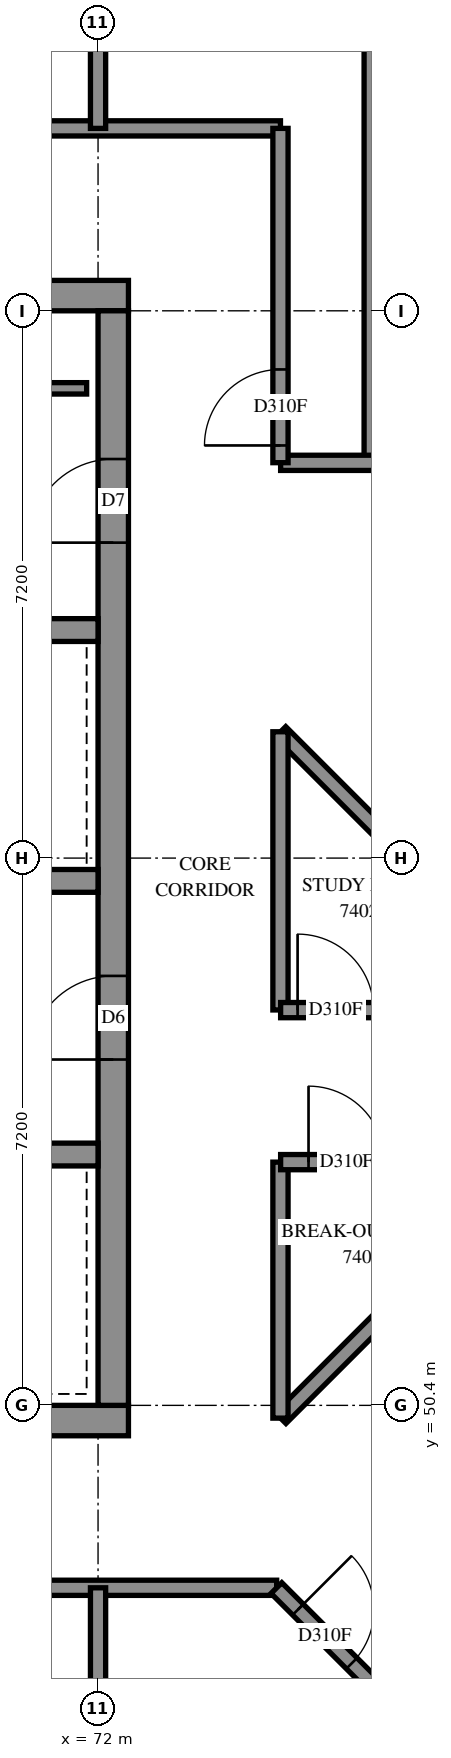
"""IFC4 building model, lengths in metres.
Left out: names, types, materials, properties, quantities, classifications, styles, units other than length and angle.
Written with IfcOpenShell. Run it as: python <this file> out.ifc"""

import sys

from ifc_helpers import new_model, si_unit, direction, frame, frame_2d, origin, place, context, subcontext, project, spatial, rectangle, extrude, element, fill, save


model = new_model("IFC4")
c1 = context("Model", 3, precision=1e-05, world=origin(), true_north=direction((0.0, 1.0)))
c2 = subcontext(c1, "Body", "Model", "MODEL_VIEW")
j1 = project(units=[si_unit("LENGTHUNIT", "METRE"), si_unit("PLANEANGLEUNIT", "RADIAN")], contexts=[c1])
p1 = place(None, origin())
s1 = spatial("IfcSite", under=j1, at=p1, CompositionType="ELEMENT")
p2 = place(p1, origin())
s2 = spatial("IfcBuilding", under=s1, at=p2, CompositionType="ELEMENT")
p3 = place(p2, frame((0.0, 0.0, 271.0)))
s3 = spatial("IfcBuildingStorey", under=s2, at=p3, CompositionType="ELEMENT", Elevation=271.0)
p4 = place(p3, frame((57.2, 50.2, -0.3), z_axis=(0.0, 0.0, 1.0), x_axis=(1.0, 0.0, 0.0)))
e1 = element("IfcWall", 1, at=p4, inside=s3, PredefinedType="SHEAR", context=c2, shape_type="SweptSolid", body=[
    extrude(rectangle(XDim=15.2, YDim=0.4, at=frame_2d((7.6, 0.0))), origin(), (0.0, 0.0, 1.0), 2.7),
])
p5 = place(p3, frame((57.2, 65.0, -0.3), z_axis=(0.0, 0.0, 1.0), x_axis=(1.0, 0.0, 0.0)))
e2 = element("IfcWall", 2, at=p5, inside=s3, PredefinedType="SHEAR", context=c2, shape_type="SweptSolid", body=[
    extrude(rectangle(XDim=15.2, YDim=0.4, at=frame_2d((7.6, 0.0))), origin(), (0.0, 0.0, 1.0), 2.7),
])
p6 = place(p5, frame((10.4, 0.0, 0.3)))
e3 = element("IfcOpeningElement", 3, at=p6, cuts=e2, PredefinedType="OPENING", context=c2, shape_type="SweptSolid", body=[
    extrude(rectangle(XDim=0.8, YDim=2.1, at=frame_2d((0.4, 1.05))), frame((0.0, 0.21, 0.0), z_axis=(0.0, -1.0, 0.0), x_axis=(1.0, 0.0, 0.0)), (0.0, 0.0, 1.0), 0.42),
])
p7 = place(p3, frame((72.2, 50.4, -0.3), z_axis=(0.0, 0.0, 1.0), x_axis=(0.0, 1.0, 0.0)))
e4 = element("IfcWall", 4, at=p7, inside=s3, PredefinedType="SHEAR", context=c2, shape_type="SweptSolid", body=[
    extrude(rectangle(XDim=14.4, YDim=0.4, at=frame_2d((7.2, 0.0))), origin(), (0.0, 0.0, 1.0), 2.7),
])
p8 = place(p7, frame((4.55, 0.0, 0.3)))
e5 = element("IfcOpeningElement", 5, at=p8, cuts=e4, PredefinedType="OPENING", context=c2, shape_type="SweptSolid", body=[
    extrude(rectangle(XDim=1.1, YDim=2.1, at=frame_2d((0.55, 1.05))), frame((0.0, 0.21, 0.0), z_axis=(0.0, -1.0, 0.0), x_axis=(1.0, 0.0, 0.0)), (0.0, 0.0, 1.0), 0.42),
])
p9 = place(p7, frame((11.35, 0.0, 0.3)))
e6 = element("IfcOpeningElement", 6, at=p9, cuts=e4, PredefinedType="OPENING", context=c2, shape_type="SweptSolid", body=[
    extrude(rectangle(XDim=1.1, YDim=2.1, at=frame_2d((0.55, 1.05))), frame((0.0, 0.21, 0.0), z_axis=(0.0, -1.0, 0.0), x_axis=(1.0, 0.0, 0.0)), (0.0, 0.0, 1.0), 0.42),
])
p10 = place(p3, frame((57.6, 53.7, 0.0), z_axis=(0.0, 0.0, 1.0), x_axis=(1.0, 0.0, 0.0)))
e7 = element("IfcWall", 7, at=p10, inside=s3, PredefinedType="SOLIDWALL", context=c2, shape_type="SweptSolid", body=[
    extrude(rectangle(XDim=14.4, YDim=0.3, at=frame_2d((7.2, 0.0))), origin(), (0.0, 0.0, 1.0), 3.1),
])
p11 = place(p10, frame((1.35, 0.0, 0.0)))
e8 = element("IfcOpeningElement", 8, at=p11, cuts=e7, PredefinedType="OPENING", context=c2, shape_type="SweptSolid", body=[
    extrude(rectangle(XDim=0.9, YDim=2.1, at=frame_2d((0.45, 1.05))), frame((0.0, 0.16, 0.0), z_axis=(0.0, -1.0, 0.0), x_axis=(1.0, 0.0, 0.0)), (0.0, 0.0, 1.0), 0.32),
])
p12 = place(p10, frame((4.95, 0.0, 0.0)))
e9 = element("IfcOpeningElement", 9, at=p12, cuts=e7, PredefinedType="OPENING", context=c2, shape_type="SweptSolid", body=[
    extrude(rectangle(XDim=0.9, YDim=2.1, at=frame_2d((0.45, 1.05))), frame((0.0, 0.16, 0.0), z_axis=(0.0, -1.0, 0.0), x_axis=(1.0, 0.0, 0.0)), (0.0, 0.0, 1.0), 0.32),
])
p13 = place(p10, frame((8.55, 0.0, 0.0)))
e10 = element("IfcOpeningElement", 10, at=p13, cuts=e7, PredefinedType="OPENING", context=c2, shape_type="SweptSolid", body=[
    extrude(rectangle(XDim=0.9, YDim=2.1, at=frame_2d((0.45, 1.05))), frame((0.0, 0.16, 0.0), z_axis=(0.0, -1.0, 0.0), x_axis=(1.0, 0.0, 0.0)), (0.0, 0.0, 1.0), 0.32),
])
p14 = place(p10, frame((12.05, 0.0, 0.0)))
e11 = element("IfcOpeningElement", 11, at=p14, cuts=e7, PredefinedType="OPENING", context=c2, shape_type="SweptSolid", body=[
    extrude(rectangle(XDim=1.1, YDim=2.1, at=frame_2d((0.55, 1.05))), frame((0.0, 0.16, 0.0), z_axis=(0.0, -1.0, 0.0), x_axis=(1.0, 0.0, 0.0)), (0.0, 0.0, 1.0), 0.32),
])
p15 = place(p3, frame((57.6, 57.3, 0.0), z_axis=(0.0, 0.0, 1.0), x_axis=(1.0, 0.0, 0.0)))
e12 = element("IfcWall", 12, at=p15, inside=s3, PredefinedType="SOLIDWALL", context=c2, shape_type="SweptSolid", body=[
    extrude(rectangle(XDim=14.4, YDim=0.3, at=frame_2d((7.2, 0.0))), origin(), (0.0, 0.0, 1.0), 3.1),
])
p16 = place(p15, frame((8.55, 0.0, 0.0)))
e13 = element("IfcOpeningElement", 13, at=p16, cuts=e12, PredefinedType="OPENING", context=c2, shape_type="SweptSolid", body=[
    extrude(rectangle(XDim=0.9, YDim=2.1, at=frame_2d((0.45, 1.05))), frame((0.0, 0.16, 0.0), z_axis=(0.0, -1.0, 0.0), x_axis=(1.0, 0.0, 0.0)), (0.0, 0.0, 1.0), 0.32),
])
p17 = place(p15, frame((1.25, 0.0, 0.0)))
e14 = element("IfcOpeningElement", 14, at=p17, cuts=e12, PredefinedType="OPENING", context=c2, shape_type="SweptSolid", body=[
    extrude(rectangle(XDim=1.1, YDim=2.1, at=frame_2d((0.55, 1.05))), frame((0.0, 0.16, 0.0), z_axis=(0.0, -1.0, 0.0), x_axis=(1.0, 0.0, 0.0)), (0.0, 0.0, 1.0), 0.32),
])
p18 = place(p15, frame((4.85, 0.0, 0.0)))
e15 = element("IfcOpeningElement", 15, at=p18, cuts=e12, PredefinedType="OPENING", context=c2, shape_type="SweptSolid", body=[
    extrude(rectangle(XDim=1.1, YDim=2.1, at=frame_2d((0.55, 1.05))), frame((0.0, 0.16, 0.0), z_axis=(0.0, -1.0, 0.0), x_axis=(1.0, 0.0, 0.0)), (0.0, 0.0, 1.0), 0.32),
])
p19 = place(p15, frame((12.05, 0.0, 0.0)))
e16 = element("IfcOpeningElement", 16, at=p19, cuts=e12, PredefinedType="OPENING", context=c2, shape_type="SweptSolid", body=[
    extrude(rectangle(XDim=1.1, YDim=2.1, at=frame_2d((0.55, 1.05))), frame((0.0, 0.16, 0.0), z_axis=(0.0, -1.0, 0.0), x_axis=(1.0, 0.0, 0.0)), (0.0, 0.0, 1.0), 0.32),
])
p20 = place(p3, frame((64.8, 60.6, 0.0), z_axis=(0.0, 0.0, 1.0), x_axis=(1.0, 0.0, 0.0)))
e17 = element("IfcWall", 17, at=p20, inside=s3, PredefinedType="SOLIDWALL", context=c2, shape_type="SweptSolid", body=[
    extrude(rectangle(XDim=7.2, YDim=0.3, at=frame_2d((3.6, 0.0))), origin(), (0.0, 0.0, 1.0), 3.1),
])
p21 = place(p3, frame((64.95, 63.78, 0.0), z_axis=(0.0, 0.0, 1.0), x_axis=(1.0, 0.0, 0.0)))
e18 = element("IfcWall", 18, at=p21, inside=s3, PredefinedType="PARTITIONING", context=c2, shape_type="SweptSolid", body=[
    extrude(rectangle(XDim=6.9, YDim=0.15, at=frame_2d((3.45, 0.0))), origin(), (0.0, 0.0, 1.0), 3.1),
])
p22 = place(p3, frame((55.2, 67.2, 0.0), z_axis=(0.0, 0.0, 1.0), x_axis=(1.0, 0.0, 0.0)))
e19 = element("IfcWall", 19, at=p22, inside=s3, PredefinedType="PARTITIONING", context=c2, shape_type="SweptSolid", body=[
    extrude(rectangle(XDim=19.2, YDim=0.2, at=frame_2d((9.6, 0.0))), origin(), (0.0, 0.0, 1.0), 3.1),
])
p23 = place(p22, frame((4.492, 0.0, 0.0)))
e20 = element("IfcOpeningElement", 20, at=p23, cuts=e19, PredefinedType="OPENING", context=c2, shape_type="SweptSolid", body=[
    extrude(rectangle(XDim=1.0, YDim=2.1, at=frame_2d((0.5, 1.05))), frame((0.0, 0.11, 0.0), z_axis=(0.0, -1.0, 0.0), x_axis=(1.0, 0.0, 0.0)), (0.0, 0.0, 1.0), 0.22),
])
p24 = place(p22, frame((6.567, 0.0, 0.0)))
e21 = element("IfcOpeningElement", 21, at=p24, cuts=e19, PredefinedType="OPENING", context=c2, shape_type="SweptSolid", body=[
    extrude(rectangle(XDim=1.0, YDim=2.1, at=frame_2d((0.5, 1.05))), frame((0.0, 0.11, 0.0), z_axis=(0.0, -1.0, 0.0), x_axis=(1.0, 0.0, 0.0)), (0.0, 0.0, 1.0), 0.22),
])
p25 = place(p22, frame((11.693, 0.0, 0.0)))
e22 = element("IfcOpeningElement", 22, at=p25, cuts=e19, PredefinedType="OPENING", context=c2, shape_type="SweptSolid", body=[
    extrude(rectangle(XDim=1.0, YDim=2.1, at=frame_2d((0.5, 1.05))), frame((0.0, 0.11, 0.0), z_axis=(0.0, -1.0, 0.0), x_axis=(1.0, 0.0, 0.0)), (0.0, 0.0, 1.0), 0.22),
])
p26 = place(p22, frame((13.88, 0.0, 0.0)))
e23 = element("IfcOpeningElement", 23, at=p26, cuts=e19, PredefinedType="OPENING", context=c2, shape_type="SweptSolid", body=[
    extrude(rectangle(XDim=1.0, YDim=2.1, at=frame_2d((0.5, 1.05))), frame((0.0, 0.11, 0.0), z_axis=(0.0, -1.0, 0.0), x_axis=(1.0, 0.0, 0.0)), (0.0, 0.0, 1.0), 0.22),
])
p27 = place(p3, frame((55.2, 48.0, 0.0), z_axis=(0.0, 0.0, 1.0), x_axis=(1.0, 0.0, 0.0)))
e24 = element("IfcWall", 24, at=p27, inside=s3, PredefinedType="PARTITIONING", context=c2, shape_type="SweptSolid", body=[
    extrude(rectangle(XDim=19.15, YDim=0.2, at=frame_2d((9.575, 0.0))), origin(), (0.0, 0.0, 1.0), 3.1),
])
p28 = place(p27, frame((4.433, 0.0, 0.0)))
e25 = element("IfcOpeningElement", 25, at=p28, cuts=e24, PredefinedType="OPENING", context=c2, shape_type="SweptSolid", body=[
    extrude(rectangle(XDim=1.0, YDim=2.1, at=frame_2d((0.5, 1.05))), frame((0.0, 0.11, 0.0), z_axis=(0.0, -1.0, 0.0), x_axis=(1.0, 0.0, 0.0)), (0.0, 0.0, 1.0), 0.22),
])
p29 = place(p27, frame((6.508, 0.0, 0.0)))
e26 = element("IfcOpeningElement", 26, at=p29, cuts=e24, PredefinedType="OPENING", context=c2, shape_type="SweptSolid", body=[
    extrude(rectangle(XDim=1.0, YDim=2.1, at=frame_2d((0.5, 1.05))), frame((0.0, 0.11, 0.0), z_axis=(0.0, -1.0, 0.0), x_axis=(1.0, 0.0, 0.0)), (0.0, 0.0, 1.0), 0.22),
])
p30 = place(p27, frame((13.499, 0.0, 0.0)))
e27 = element("IfcOpeningElement", 27, at=p30, cuts=e24, PredefinedType="OPENING", context=c2, shape_type="SweptSolid", body=[
    extrude(rectangle(XDim=0.9, YDim=2.1, at=frame_2d((0.45, 1.05))), frame((0.0, 0.11, 0.0), z_axis=(0.0, -1.0, 0.0), x_axis=(1.0, 0.0, 0.0)), (0.0, 0.0, 1.0), 0.22),
])
p31 = place(p3, frame((75.6, 62.8, 0.0), z_axis=(0.0, 0.0, 1.0), x_axis=(0.0, 1.0, 0.0)))
e28 = element("IfcWall", 28, at=p31, inside=s3, PredefinedType="PARTITIONING", context=c2, shape_type="SweptSolid", body=[
    extrude(rectangle(XDim=10.049, YDim=0.2, at=frame_2d((5.025, 0.0))), origin(), (0.0, 0.0, 1.0), 3.1),
])
p32 = place(p3, frame((74.402, 62.8, 0.0), z_axis=(0.0, 0.0, 1.0), x_axis=(1.0, 0.0, 0.0)))
e29 = element("IfcWall", 29, at=p32, inside=s3, PredefinedType="PARTITIONING", context=c2, shape_type="SweptSolid", body=[
    extrude(rectangle(XDim=4.798, YDim=0.2, at=frame_2d((2.399, 0.0))), origin(), (0.0, 0.0, 1.0), 3.1),
])
p33 = place(p32, frame((1.766, 0.0, 0.0)))
e30 = element("IfcOpeningElement", 30, at=p33, cuts=e29, PredefinedType="OPENING", context=c2, shape_type="SweptSolid", body=[
    extrude(rectangle(XDim=1.0, YDim=2.1, at=frame_2d((0.5, 1.05))), frame((0.0, 0.11, 0.0), z_axis=(0.0, -1.0, 0.0), x_axis=(1.0, 0.0, 0.0)), (0.0, 0.0, 1.0), 0.22),
])
p34 = place(p3, frame((74.401, 50.233, 0.0), z_axis=(0.0, 0.0, 1.0), x_axis=(0.7071067812, 0.7071067812, 0.0)))
e31 = element("IfcWall", 31, at=p34, inside=s3, PredefinedType="PARTITIONING", context=c2, shape_type="SweptSolid", body=[
    extrude(rectangle(XDim=4.76, YDim=0.2, at=frame_2d((2.38, 0.0))), origin(), (0.0, 0.0, 1.0), 3.1),
])
p35 = place(p3, frame((74.347, 47.997, 0.0), z_axis=(0.0, 0.0, 1.0), x_axis=(0.7071067812, -0.7071067812, 0.0)))
e32 = element("IfcWall", 32, at=p35, inside=s3, PredefinedType="PARTITIONING", context=c2, shape_type="SweptSolid", body=[
    extrude(rectangle(XDim=4.596, YDim=0.2, at=frame_2d((2.298, 0.0))), origin(), (0.0, 0.0, 1.0), 3.1),
])
p36 = place(p35, frame((0.401, 0.0, 0.0)))
e33 = element("IfcOpeningElement", 33, at=p36, cuts=e32, PredefinedType="OPENING", context=c2, shape_type="SweptSolid", body=[
    extrude(rectangle(XDim=1.0, YDim=2.1, at=frame_2d((0.5, 1.05))), frame((0.0, 0.11, 0.0), z_axis=(0.0, -1.0, 0.0), x_axis=(1.0, 0.0, 0.0)), (0.0, 0.0, 1.0), 0.22),
])
p37 = place(p3, frame((74.399, 59.259, 0.0), z_axis=(0.0, 0.0, 1.0), x_axis=(0.7071067812, -0.7071067812, 0.0)))
e34 = element("IfcWall", 34, at=p37, inside=s3, PredefinedType="PARTITIONING", context=c2, shape_type="SweptSolid", body=[
    extrude(rectangle(XDim=4.497, YDim=0.2, at=frame_2d((2.249, 0.0))), origin(), (0.0, 0.0, 1.0), 3.1),
])
p38 = place(p3, frame((72.0, 43.55, 0.0), z_axis=(0.0, 0.0, 1.0), x_axis=(0.0, 1.0, 0.0)))
e35 = element("IfcWall", 35, at=p38, inside=s3, PredefinedType="PARTITIONING", context=c2, shape_type="SweptSolid", body=[
    extrude(rectangle(XDim=4.45, YDim=0.2, at=frame_2d((2.225, 0.0))), origin(), (0.0, 0.0, 1.0), 3.1),
])
p39 = place(p3, frame((74.4, 62.802, 0.0), z_axis=(0.0, 0.0, 1.0), x_axis=(0.0, 1.0, 0.0)))
e36 = element("IfcWall", 36, at=p39, inside=s3, PredefinedType="PARTITIONING", context=c2, shape_type="SweptSolid", body=[
    extrude(rectangle(XDim=4.398, YDim=0.2, at=frame_2d((2.199, 0.0))), origin(), (0.0, 0.0, 1.0), 3.1),
])
p40 = place(p39, frame((0.227, 0.0, 0.0)))
e37 = element("IfcOpeningElement", 37, at=p40, cuts=e36, PredefinedType="OPENING", context=c2, shape_type="SweptSolid", body=[
    extrude(rectangle(XDim=1.0, YDim=2.1, at=frame_2d((0.5, 1.05))), frame((0.0, 0.11, 0.0), z_axis=(0.0, -1.0, 0.0), x_axis=(1.0, 0.0, 0.0)), (0.0, 0.0, 1.0), 0.22),
])
p41 = place(p3, frame((72.0, 67.2, 0.0), z_axis=(0.0, 0.0, 1.0), x_axis=(0.0, 1.0, 0.0)))
e38 = element("IfcWall", 38, at=p41, inside=s3, PredefinedType="PARTITIONING", context=c2, shape_type="SweptSolid", body=[
    extrude(rectangle(XDim=4.346, YDim=0.2, at=frame_2d((2.173, 0.0))), origin(), (0.0, 0.0, 1.0), 3.1),
])
p42 = place(p3, frame((74.4, 55.602, 0.0), z_axis=(0.0, 0.0, 1.0), x_axis=(0.0, 1.0, 0.0)))
e39 = element("IfcWall", 39, at=p42, inside=s3, PredefinedType="PARTITIONING", context=c2, shape_type="SweptSolid", body=[
    extrude(rectangle(XDim=3.66, YDim=0.2, at=frame_2d((1.83, 0.0))), origin(), (0.0, 0.0, 1.0), 3.1),
])
p43 = place(p3, frame((74.4, 50.232, 0.0), z_axis=(0.0, 0.0, 1.0), x_axis=(0.0, 1.0, 0.0)))
e40 = element("IfcWall", 40, at=p43, inside=s3, PredefinedType="PARTITIONING", context=c2, shape_type="SweptSolid", body=[
    extrude(rectangle(XDim=3.368, YDim=0.2, at=frame_2d((1.684, 0.0))), origin(), (0.0, 0.0, 1.0), 3.1),
])
p44 = place(p3, frame((74.402, 53.6, 0.0), z_axis=(0.0, 0.0, 1.0), x_axis=(1.0, 0.0, 0.0)))
e41 = element("IfcWall", 41, at=p44, inside=s3, PredefinedType="PARTITIONING", context=c2, shape_type="SweptSolid", body=[
    extrude(rectangle(XDim=3.366, YDim=0.2, at=frame_2d((1.683, 0.0))), origin(), (0.0, 0.0, 1.0), 3.1),
])
p45 = place(p44, frame((0.367, 0.0, 0.0)))
e42 = element("IfcOpeningElement", 42, at=p45, cuts=e41, PredefinedType="OPENING", context=c2, shape_type="SweptSolid", body=[
    extrude(rectangle(XDim=1.0, YDim=2.1, at=frame_2d((0.5, 1.05))), frame((0.0, 0.11, 0.0), z_axis=(0.0, -1.0, 0.0), x_axis=(1.0, 0.0, 0.0)), (0.0, 0.0, 1.0), 0.22),
])
p46 = place(p3, frame((74.402, 55.6, 0.0), z_axis=(0.0, 0.0, 1.0), x_axis=(1.0, 0.0, 0.0)))
e43 = element("IfcWall", 43, at=p46, inside=s3, PredefinedType="PARTITIONING", context=c2, shape_type="SweptSolid", body=[
    extrude(rectangle(XDim=2.928, YDim=0.2, at=frame_2d((1.464, 0.0))), origin(), (0.0, 0.0, 1.0), 3.1),
])
p47 = place(p46, frame((0.223, 0.0, 0.0)))
e44 = element("IfcOpeningElement", 44, at=p47, cuts=e43, PredefinedType="OPENING", context=c2, shape_type="SweptSolid", body=[
    extrude(rectangle(XDim=1.0, YDim=2.1, at=frame_2d((0.5, 1.05))), frame((0.0, 0.11, 0.0), z_axis=(0.0, -1.0, 0.0), x_axis=(1.0, 0.0, 0.0)), (0.0, 0.0, 1.0), 0.22),
])
p48 = place(p8, origin())
e45 = element("IfcDoor", 45, at=p48, inside=s3, OperationType="DOUBLE_DOOR_SINGLE_SWING", PredefinedType="DOOR", context=c2, shape_type="SweptSolid", body=[
    extrude(rectangle(XDim=1.1, YDim=2.1, at=frame_2d((0.55, 1.05))), frame((0.0, 0.025, 0.0), z_axis=(0.0, -1.0, 0.0), x_axis=(1.0, 0.0, 0.0)), (0.0, 0.0, 1.0), 0.05),
])
fill(e5, e45)
p49 = place(p9, origin())
e46 = element("IfcDoor", 46, at=p49, inside=s3, OperationType="SINGLE_SWING_RIGHT", PredefinedType="DOOR", context=c2, shape_type="SweptSolid", body=[
    extrude(rectangle(XDim=1.1, YDim=2.1, at=frame_2d((0.55, 1.05))), frame((0.0, 0.025, 0.0), z_axis=(0.0, -1.0, 0.0), x_axis=(1.0, 0.0, 0.0)), (0.0, 0.0, 1.0), 0.05),
])
fill(e6, e46)
p50 = place(p45, origin())
e47 = element("IfcDoor", 47, at=p50, inside=s3, OperationType="SINGLE_SWING_RIGHT", PredefinedType="DOOR", context=c2, shape_type="SweptSolid", body=[
    extrude(rectangle(XDim=1.0, YDim=2.1, at=frame_2d((0.5, 1.05))), frame((0.0, 0.025, 0.0), z_axis=(0.0, -1.0, 0.0), x_axis=(1.0, 0.0, 0.0)), (0.0, 0.0, 1.0), 0.05),
])
fill(e42, e47)
p51 = place(p36, origin())
e48 = element("IfcDoor", 48, at=p51, inside=s3, OperationType="SINGLE_SWING_LEFT", PredefinedType="DOOR", context=c2, shape_type="SweptSolid", body=[
    extrude(rectangle(XDim=1.0, YDim=2.1, at=frame_2d((0.5, 1.05))), frame((0.0, 0.025, 0.0), z_axis=(0.0, -1.0, 0.0), x_axis=(1.0, 0.0, 0.0)), (0.0, 0.0, 1.0), 0.05),
])
fill(e33, e48)
p52 = place(p47, origin())
e49 = element("IfcDoor", 49, at=p52, inside=s3, OperationType="SINGLE_SWING_LEFT", PredefinedType="DOOR", context=c2, shape_type="SweptSolid", body=[
    extrude(rectangle(XDim=1.0, YDim=2.1, at=frame_2d((0.5, 1.05))), frame((0.0, 0.025, 0.0), z_axis=(0.0, -1.0, 0.0), x_axis=(1.0, 0.0, 0.0)), (0.0, 0.0, 1.0), 0.05),
])
fill(e44, e49)
p53 = place(p40, origin())
e50 = element("IfcDoor", 50, at=p53, inside=s3, OperationType="SINGLE_SWING_RIGHT", PredefinedType="DOOR", context=c2, shape_type="SweptSolid", body=[
    extrude(rectangle(XDim=1.0, YDim=2.1, at=frame_2d((0.5, 1.05))), frame((0.0, 0.025, 0.0), z_axis=(0.0, -1.0, 0.0), x_axis=(1.0, 0.0, 0.0)), (0.0, 0.0, 1.0), 0.05),
])
fill(e37, e50)
save(model, sys.argv[1])
